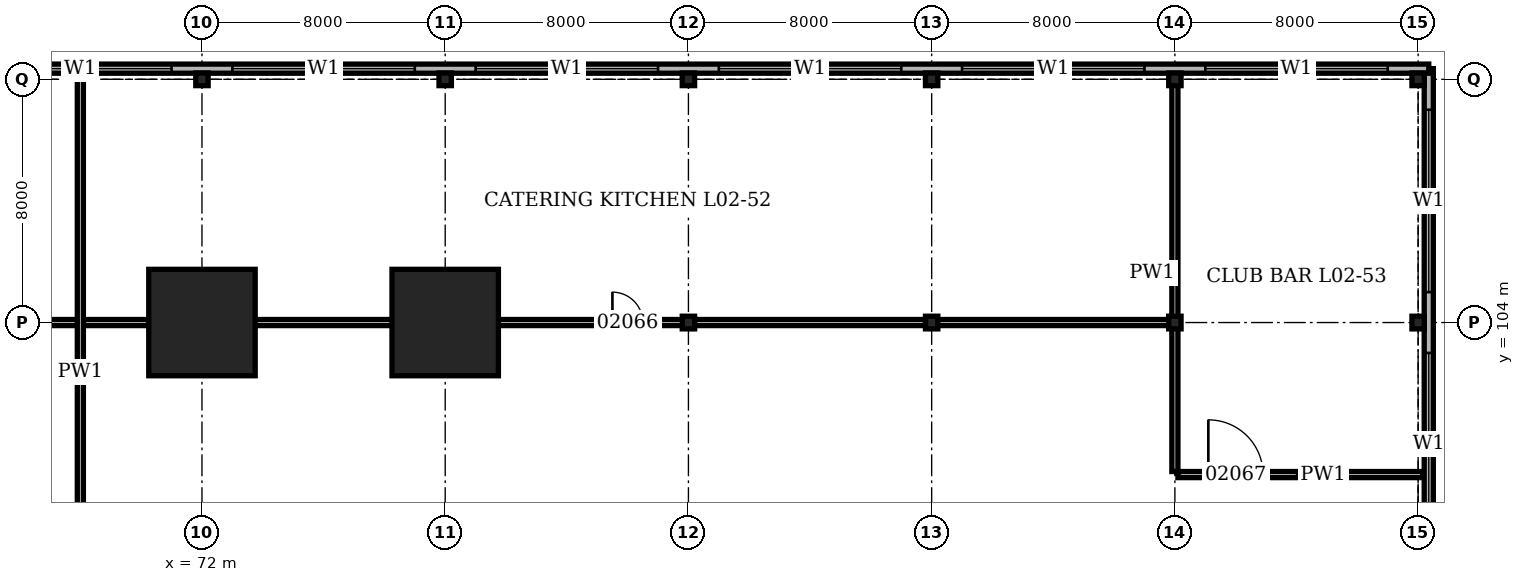
"""IFC4 building model, lengths in metres.
Left out: names, types, materials, properties, quantities, classifications, styles, units other than length and angle.
Written with IfcOpenShell. Run it as: python <this file> out.ifc"""

import sys

from ifc_helpers import new_model, si_unit, direction, frame, frame_2d, origin, origin_2d, place, context, subcontext, project, spatial, rectangle, hollow_rectangle, i_section, extrude, element, fill, save


model = new_model("IFC4")
c1 = context("Model", 3, precision=1e-05, world=origin(), true_north=direction((0.0, 1.0)))
c2 = subcontext(c1, "Body", "Model", "MODEL_VIEW")
j1 = project(units=[si_unit("LENGTHUNIT", "METRE"), si_unit("PLANEANGLEUNIT", "RADIAN")], contexts=[c1])
p1 = place(None, origin())
s1 = spatial("IfcSite", under=j1, at=p1, CompositionType="ELEMENT")
p2 = place(p1, origin())
s2 = spatial("IfcBuilding", under=s1, at=p2, CompositionType="ELEMENT")
p3 = place(p2, frame((0.0, 0.0, 9.9)))
s3 = spatial("IfcBuildingStorey", under=s2, at=p3, CompositionType="ELEMENT", Elevation=9.9)
p4 = place(p3, frame((72.0, 104.0, 0.0), z_axis=(0.0, 0.0, 1.0), x_axis=(1.0, 0.0, 0.0)))
e1 = element("IfcColumn", 1, at=p4, inside=s3, PredefinedType="COLUMN", context=c2, shape_type="SweptSolid", body=[
    extrude(hollow_rectangle(XDim=3.5, YDim=3.5, WallThickness=0.5, at=origin_2d()), origin(), (0.0, 0.0, 1.0), 5.0),
])
p5 = place(p3, frame((72.0, 112.0, 0.0), z_axis=(0.0, 0.0, 1.0), x_axis=(1.0, 0.0, 0.0)))
e2 = element("IfcColumn", 2, at=p5, inside=s3, PredefinedType="COLUMN", context=c2, shape_type="SweptSolid", body=[
    extrude(i_section(OverallWidth=0.406, OverallDepth=0.417, WebThickness=0.03, FlangeThickness=0.048, at=origin_2d()), origin(), (0.0, 0.0, 1.0), 5.0),
])
p6 = place(p3, frame((80.0, 104.0, 0.0), z_axis=(0.0, 0.0, 1.0), x_axis=(1.0, 0.0, 0.0)))
e3 = element("IfcColumn", 3, at=p6, inside=s3, PredefinedType="COLUMN", context=c2, shape_type="SweptSolid", body=[
    extrude(hollow_rectangle(XDim=3.5, YDim=3.5, WallThickness=0.5, at=origin_2d()), origin(), (0.0, 0.0, 1.0), 5.0),
])
for number, where, z_axis, x_axis in (
    (4, (80.0, 112.0, 0.0), (0.0, 0.0, 1.0), (1.0, 0.0, 0.0)),
    (5, (88.0, 104.0, 0.0), (0.0, 0.0, 1.0), (1.0, 0.0, 0.0)),
    (6, (88.0, 112.0, 0.0), (0.0, 0.0, 1.0), (1.0, 0.0, 0.0)),
    (7, (96.0, 104.0, 0.0), (0.0, 0.0, 1.0), (1.0, 0.0, 0.0)),
    (8, (96.0, 112.0, 0.0), (0.0, 0.0, 1.0), (1.0, 0.0, 0.0)),
    (9, (104.0, 104.0, 0.0), (0.0, 0.0, 1.0), (1.0, 0.0, 0.0)),
    (10, (104.0, 112.0, 0.0), (0.0, 0.0, 1.0), (1.0, 0.0, 0.0)),
    (11, (112.0, 104.0, 0.0), (0.0, 0.0, 1.0), (1.0, 0.0, 0.0)),
    (12, (112.0, 112.0, 0.0), (0.0, 0.0, 1.0), (1.0, 0.0, 0.0)),
):
    element("IfcColumn", number, at=place(p3, frame(where, z_axis=z_axis, x_axis=x_axis)), inside=s3, PredefinedType="COLUMN", context=c2, shape_type="SweptSolid", body=[
        extrude(i_section(OverallWidth=0.406, OverallDepth=0.417, WebThickness=0.03, FlangeThickness=0.048, at=origin_2d()), origin(), (0.0, 0.0, 1.0), 5.0),
    ])
p7 = place(p3, frame((112.35, -0.35, 0.0), z_axis=(0.0, 0.0, 1.0), x_axis=(0.0, 1.0, 0.0)))
e13 = element("IfcWall", 13, at=p7, inside=s3, PredefinedType="SOLIDWALL", context=c2, shape_type="SweptSolid", body=[
    extrude(rectangle(XDim=112.7, YDim=0.3, at=frame_2d((56.35, 0.0))), origin(), (0.0, 0.0, 1.0), 5.0),
])
p8 = place(p7, frame((1.35, 0.0, 1.0)))
e14 = element("IfcOpeningElement", 14, at=p8, cuts=e13, PredefinedType="OPENING", context=c2, shape_type="SweptSolid", body=[
    extrude(rectangle(XDim=6.0, YDim=1.5, at=frame_2d((3.0, 0.75))), frame((0.0, 0.16, 0.0), z_axis=(0.0, -1.0, 0.0), x_axis=(1.0, 0.0, 0.0)), (0.0, 0.0, 1.0), 0.32),
])
p9 = place(p7, frame((9.35, 0.0, 1.0)))
e15 = element("IfcOpeningElement", 15, at=p9, cuts=e13, PredefinedType="OPENING", context=c2, shape_type="SweptSolid", body=[
    extrude(rectangle(XDim=6.0, YDim=1.5, at=frame_2d((3.0, 0.75))), frame((0.0, 0.16, 0.0), z_axis=(0.0, -1.0, 0.0), x_axis=(1.0, 0.0, 0.0)), (0.0, 0.0, 1.0), 0.32),
])
p10 = place(p7, frame((17.35, 0.0, 1.0)))
e16 = element("IfcOpeningElement", 16, at=p10, cuts=e13, PredefinedType="OPENING", context=c2, shape_type="SweptSolid", body=[
    extrude(rectangle(XDim=6.0, YDim=1.5, at=frame_2d((3.0, 0.75))), frame((0.0, 0.16, 0.0), z_axis=(0.0, -1.0, 0.0), x_axis=(1.0, 0.0, 0.0)), (0.0, 0.0, 1.0), 0.32),
])
p11 = place(p7, frame((25.35, 0.0, 1.0)))
e17 = element("IfcOpeningElement", 17, at=p11, cuts=e13, PredefinedType="OPENING", context=c2, shape_type="SweptSolid", body=[
    extrude(rectangle(XDim=6.0, YDim=1.5, at=frame_2d((3.0, 0.75))), frame((0.0, 0.16, 0.0), z_axis=(0.0, -1.0, 0.0), x_axis=(1.0, 0.0, 0.0)), (0.0, 0.0, 1.0), 0.32),
])
p12 = place(p7, frame((33.35, 0.0, 1.0)))
e18 = element("IfcOpeningElement", 18, at=p12, cuts=e13, PredefinedType="OPENING", context=c2, shape_type="SweptSolid", body=[
    extrude(rectangle(XDim=6.0, YDim=1.5, at=frame_2d((3.0, 0.75))), frame((0.0, 0.16, 0.0), z_axis=(0.0, -1.0, 0.0), x_axis=(1.0, 0.0, 0.0)), (0.0, 0.0, 1.0), 0.32),
])
p13 = place(p7, frame((41.35, 0.0, 1.0)))
e19 = element("IfcOpeningElement", 19, at=p13, cuts=e13, PredefinedType="OPENING", context=c2, shape_type="SweptSolid", body=[
    extrude(rectangle(XDim=6.0, YDim=1.5, at=frame_2d((3.0, 0.75))), frame((0.0, 0.16, 0.0), z_axis=(0.0, -1.0, 0.0), x_axis=(1.0, 0.0, 0.0)), (0.0, 0.0, 1.0), 0.32),
])
p14 = place(p7, frame((49.35, 0.0, 1.0)))
e20 = element("IfcOpeningElement", 20, at=p14, cuts=e13, PredefinedType="OPENING", context=c2, shape_type="SweptSolid", body=[
    extrude(rectangle(XDim=6.0, YDim=1.5, at=frame_2d((3.0, 0.75))), frame((0.0, 0.16, 0.0), z_axis=(0.0, -1.0, 0.0), x_axis=(1.0, 0.0, 0.0)), (0.0, 0.0, 1.0), 0.32),
])
p15 = place(p7, frame((57.35, 0.0, 1.0)))
e21 = element("IfcOpeningElement", 21, at=p15, cuts=e13, PredefinedType="OPENING", context=c2, shape_type="SweptSolid", body=[
    extrude(rectangle(XDim=6.0, YDim=1.5, at=frame_2d((3.0, 0.75))), frame((0.0, 0.16, 0.0), z_axis=(0.0, -1.0, 0.0), x_axis=(1.0, 0.0, 0.0)), (0.0, 0.0, 1.0), 0.32),
])
p16 = place(p7, frame((65.35, 0.0, 1.0)))
e22 = element("IfcOpeningElement", 22, at=p16, cuts=e13, PredefinedType="OPENING", context=c2, shape_type="SweptSolid", body=[
    extrude(rectangle(XDim=6.0, YDim=1.5, at=frame_2d((3.0, 0.75))), frame((0.0, 0.16, 0.0), z_axis=(0.0, -1.0, 0.0), x_axis=(1.0, 0.0, 0.0)), (0.0, 0.0, 1.0), 0.32),
])
p17 = place(p7, frame((73.35, 0.0, 1.0)))
e23 = element("IfcOpeningElement", 23, at=p17, cuts=e13, PredefinedType="OPENING", context=c2, shape_type="SweptSolid", body=[
    extrude(rectangle(XDim=6.0, YDim=1.5, at=frame_2d((3.0, 0.75))), frame((0.0, 0.16, 0.0), z_axis=(0.0, -1.0, 0.0), x_axis=(1.0, 0.0, 0.0)), (0.0, 0.0, 1.0), 0.32),
])
p18 = place(p7, frame((81.35, 0.0, 1.0)))
e24 = element("IfcOpeningElement", 24, at=p18, cuts=e13, PredefinedType="OPENING", context=c2, shape_type="SweptSolid", body=[
    extrude(rectangle(XDim=6.0, YDim=1.5, at=frame_2d((3.0, 0.75))), frame((0.0, 0.16, 0.0), z_axis=(0.0, -1.0, 0.0), x_axis=(1.0, 0.0, 0.0)), (0.0, 0.0, 1.0), 0.32),
])
p19 = place(p7, frame((89.35, 0.0, 1.0)))
e25 = element("IfcOpeningElement", 25, at=p19, cuts=e13, PredefinedType="OPENING", context=c2, shape_type="SweptSolid", body=[
    extrude(rectangle(XDim=6.0, YDim=1.5, at=frame_2d((3.0, 0.75))), frame((0.0, 0.16, 0.0), z_axis=(0.0, -1.0, 0.0), x_axis=(1.0, 0.0, 0.0)), (0.0, 0.0, 1.0), 0.32),
])
p20 = place(p7, frame((97.35, 0.0, 1.0)))
e26 = element("IfcOpeningElement", 26, at=p20, cuts=e13, PredefinedType="OPENING", context=c2, shape_type="SweptSolid", body=[
    extrude(rectangle(XDim=6.0, YDim=1.5, at=frame_2d((3.0, 0.75))), frame((0.0, 0.16, 0.0), z_axis=(0.0, -1.0, 0.0), x_axis=(1.0, 0.0, 0.0)), (0.0, 0.0, 1.0), 0.32),
])
p21 = place(p7, frame((105.35, 0.0, 1.0)))
e27 = element("IfcOpeningElement", 27, at=p21, cuts=e13, PredefinedType="OPENING", context=c2, shape_type="SweptSolid", body=[
    extrude(rectangle(XDim=6.0, YDim=1.5, at=frame_2d((3.0, 0.75))), frame((0.0, 0.16, 0.0), z_axis=(0.0, -1.0, 0.0), x_axis=(1.0, 0.0, 0.0)), (0.0, 0.0, 1.0), 0.32),
])
p22 = place(p3, frame((112.35, 112.35, 0.0), z_axis=(0.0, 0.0, 1.0), x_axis=(-1.0, 0.0, 0.0)))
e28 = element("IfcWall", 28, at=p22, inside=s3, PredefinedType="SOLIDWALL", context=c2, shape_type="SweptSolid", body=[
    extrude(rectangle(XDim=112.7, YDim=0.3, at=frame_2d((56.35, 0.0))), origin(), (0.0, 0.0, 1.0), 5.0),
])
p23 = place(p22, frame((1.35, 0.0, 1.0)))
e29 = element("IfcOpeningElement", 29, at=p23, cuts=e28, PredefinedType="OPENING", context=c2, shape_type="SweptSolid", body=[
    extrude(rectangle(XDim=6.0, YDim=1.5, at=frame_2d((3.0, 0.75))), frame((0.0, 0.16, 0.0), z_axis=(0.0, -1.0, 0.0), x_axis=(1.0, 0.0, 0.0)), (0.0, 0.0, 1.0), 0.32),
])
p24 = place(p22, frame((9.35, 0.0, 1.0)))
e30 = element("IfcOpeningElement", 30, at=p24, cuts=e28, PredefinedType="OPENING", context=c2, shape_type="SweptSolid", body=[
    extrude(rectangle(XDim=6.0, YDim=1.5, at=frame_2d((3.0, 0.75))), frame((0.0, 0.16, 0.0), z_axis=(0.0, -1.0, 0.0), x_axis=(1.0, 0.0, 0.0)), (0.0, 0.0, 1.0), 0.32),
])
p25 = place(p22, frame((17.35, 0.0, 1.0)))
e31 = element("IfcOpeningElement", 31, at=p25, cuts=e28, PredefinedType="OPENING", context=c2, shape_type="SweptSolid", body=[
    extrude(rectangle(XDim=6.0, YDim=1.5, at=frame_2d((3.0, 0.75))), frame((0.0, 0.16, 0.0), z_axis=(0.0, -1.0, 0.0), x_axis=(1.0, 0.0, 0.0)), (0.0, 0.0, 1.0), 0.32),
])
p26 = place(p22, frame((25.35, 0.0, 1.0)))
e32 = element("IfcOpeningElement", 32, at=p26, cuts=e28, PredefinedType="OPENING", context=c2, shape_type="SweptSolid", body=[
    extrude(rectangle(XDim=6.0, YDim=1.5, at=frame_2d((3.0, 0.75))), frame((0.0, 0.16, 0.0), z_axis=(0.0, -1.0, 0.0), x_axis=(1.0, 0.0, 0.0)), (0.0, 0.0, 1.0), 0.32),
])
p27 = place(p22, frame((33.35, 0.0, 1.0)))
e33 = element("IfcOpeningElement", 33, at=p27, cuts=e28, PredefinedType="OPENING", context=c2, shape_type="SweptSolid", body=[
    extrude(rectangle(XDim=6.0, YDim=1.5, at=frame_2d((3.0, 0.75))), frame((0.0, 0.16, 0.0), z_axis=(0.0, -1.0, 0.0), x_axis=(1.0, 0.0, 0.0)), (0.0, 0.0, 1.0), 0.32),
])
p28 = place(p22, frame((41.35, 0.0, 1.0)))
e34 = element("IfcOpeningElement", 34, at=p28, cuts=e28, PredefinedType="OPENING", context=c2, shape_type="SweptSolid", body=[
    extrude(rectangle(XDim=6.0, YDim=1.5, at=frame_2d((3.0, 0.75))), frame((0.0, 0.16, 0.0), z_axis=(0.0, -1.0, 0.0), x_axis=(1.0, 0.0, 0.0)), (0.0, 0.0, 1.0), 0.32),
])
p29 = place(p22, frame((49.35, 0.0, 1.0)))
e35 = element("IfcOpeningElement", 35, at=p29, cuts=e28, PredefinedType="OPENING", context=c2, shape_type="SweptSolid", body=[
    extrude(rectangle(XDim=6.0, YDim=1.5, at=frame_2d((3.0, 0.75))), frame((0.0, 0.16, 0.0), z_axis=(0.0, -1.0, 0.0), x_axis=(1.0, 0.0, 0.0)), (0.0, 0.0, 1.0), 0.32),
])
p30 = place(p22, frame((57.35, 0.0, 1.0)))
e36 = element("IfcOpeningElement", 36, at=p30, cuts=e28, PredefinedType="OPENING", context=c2, shape_type="SweptSolid", body=[
    extrude(rectangle(XDim=6.0, YDim=1.5, at=frame_2d((3.0, 0.75))), frame((0.0, 0.16, 0.0), z_axis=(0.0, -1.0, 0.0), x_axis=(1.0, 0.0, 0.0)), (0.0, 0.0, 1.0), 0.32),
])
p31 = place(p22, frame((65.35, 0.0, 1.0)))
e37 = element("IfcOpeningElement", 37, at=p31, cuts=e28, PredefinedType="OPENING", context=c2, shape_type="SweptSolid", body=[
    extrude(rectangle(XDim=6.0, YDim=1.5, at=frame_2d((3.0, 0.75))), frame((0.0, 0.16, 0.0), z_axis=(0.0, -1.0, 0.0), x_axis=(1.0, 0.0, 0.0)), (0.0, 0.0, 1.0), 0.32),
])
p32 = place(p22, frame((73.35, 0.0, 1.0)))
e38 = element("IfcOpeningElement", 38, at=p32, cuts=e28, PredefinedType="OPENING", context=c2, shape_type="SweptSolid", body=[
    extrude(rectangle(XDim=6.0, YDim=1.5, at=frame_2d((3.0, 0.75))), frame((0.0, 0.16, 0.0), z_axis=(0.0, -1.0, 0.0), x_axis=(1.0, 0.0, 0.0)), (0.0, 0.0, 1.0), 0.32),
])
p33 = place(p22, frame((81.35, 0.0, 1.0)))
e39 = element("IfcOpeningElement", 39, at=p33, cuts=e28, PredefinedType="OPENING", context=c2, shape_type="SweptSolid", body=[
    extrude(rectangle(XDim=6.0, YDim=1.5, at=frame_2d((3.0, 0.75))), frame((0.0, 0.16, 0.0), z_axis=(0.0, -1.0, 0.0), x_axis=(1.0, 0.0, 0.0)), (0.0, 0.0, 1.0), 0.32),
])
p34 = place(p22, frame((89.35, 0.0, 1.0)))
e40 = element("IfcOpeningElement", 40, at=p34, cuts=e28, PredefinedType="OPENING", context=c2, shape_type="SweptSolid", body=[
    extrude(rectangle(XDim=6.0, YDim=1.5, at=frame_2d((3.0, 0.75))), frame((0.0, 0.16, 0.0), z_axis=(0.0, -1.0, 0.0), x_axis=(1.0, 0.0, 0.0)), (0.0, 0.0, 1.0), 0.32),
])
p35 = place(p22, frame((97.35, 0.0, 1.0)))
e41 = element("IfcOpeningElement", 41, at=p35, cuts=e28, PredefinedType="OPENING", context=c2, shape_type="SweptSolid", body=[
    extrude(rectangle(XDim=6.0, YDim=1.5, at=frame_2d((3.0, 0.75))), frame((0.0, 0.16, 0.0), z_axis=(0.0, -1.0, 0.0), x_axis=(1.0, 0.0, 0.0)), (0.0, 0.0, 1.0), 0.32),
])
p36 = place(p22, frame((105.35, 0.0, 1.0)))
e42 = element("IfcOpeningElement", 42, at=p36, cuts=e28, PredefinedType="OPENING", context=c2, shape_type="SweptSolid", body=[
    extrude(rectangle(XDim=6.0, YDim=1.5, at=frame_2d((3.0, 0.75))), frame((0.0, 0.16, 0.0), z_axis=(0.0, -1.0, 0.0), x_axis=(1.0, 0.0, 0.0)), (0.0, 0.0, 1.0), 0.32),
])
p37 = place(p3, frame((104.1, 99.0, 0.0), z_axis=(0.0, 0.0, 1.0), x_axis=(1.0, 0.0, 0.0)))
e43 = element("IfcWall", 43, at=p37, inside=s3, PredefinedType="PARTITIONING", context=c2, shape_type="SweptSolid", body=[
    extrude(rectangle(XDim=8.05, YDim=0.2, at=frame_2d((4.025, 0.0))), origin(), (0.0, 0.0, 1.0), 4.8),
])
p38 = place(p37, frame((1.0, 0.0, 0.0)))
e44 = element("IfcOpeningElement", 44, at=p38, cuts=e43, PredefinedType="OPENING", context=c2, shape_type="SweptSolid", body=[
    extrude(rectangle(XDim=1.8, YDim=2.4, at=frame_2d((0.9, 1.2))), frame((0.0, 0.11, 0.0), z_axis=(0.0, -1.0, 0.0), x_axis=(1.0, 0.0, 0.0)), (0.0, 0.0, 1.0), 0.22),
])
p39 = place(p3, frame((12.95, 104.0, 0.0), z_axis=(0.0, 0.0, 1.0), x_axis=(1.0, 0.0, 0.0)))
e45 = element("IfcWall", 45, at=p39, inside=s3, PredefinedType="PARTITIONING", context=c2, shape_type="SweptSolid", body=[
    extrude(rectangle(XDim=90.95, YDim=0.2, at=frame_2d((45.475, 0.0))), origin(), (0.0, 0.0, 1.0), 4.028),
])
p40 = place(p39, frame((14.575, 0.0, 0.0)))
e46 = element("IfcOpeningElement", 46, at=p40, cuts=e45, PredefinedType="OPENING", context=c2, shape_type="SweptSolid", body=[
    extrude(rectangle(XDim=1.8, YDim=2.4, at=frame_2d((0.9, 1.2))), frame((0.0, 0.11, 0.0), z_axis=(0.0, -1.0, 0.0), x_axis=(1.0, 0.0, 0.0)), (0.0, 0.0, 1.0), 0.22),
])
p41 = place(p39, frame((37.15, 0.0, 0.0)))
e47 = element("IfcOpeningElement", 47, at=p41, cuts=e45, PredefinedType="OPENING", context=c2, shape_type="SweptSolid", body=[
    extrude(rectangle(XDim=1.8, YDim=2.4, at=frame_2d((0.9, 1.2))), frame((0.0, 0.11, 0.0), z_axis=(0.0, -1.0, 0.0), x_axis=(1.0, 0.0, 0.0)), (0.0, 0.0, 1.0), 0.22),
])
p42 = place(p39, frame((72.55, 0.0, 0.0)))
e48 = element("IfcOpeningElement", 48, at=p42, cuts=e45, PredefinedType="OPENING", context=c2, shape_type="SweptSolid", body=[
    extrude(rectangle(XDim=1.0, YDim=2.1, at=frame_2d((0.5, 1.05))), frame((0.0, 0.11, 0.0), z_axis=(0.0, -1.0, 0.0), x_axis=(1.0, 0.0, 0.0)), (0.0, 0.0, 1.0), 0.22),
])
p43 = place(p3, frame((68.0, 92.6, 0.0), z_axis=(0.0, 0.0, 1.0), x_axis=(0.0, 1.0, 0.0)))
e49 = element("IfcWall", 49, at=p43, inside=s3, PredefinedType="PARTITIONING", context=c2, shape_type="SweptSolid", body=[
    extrude(rectangle(XDim=19.55, YDim=0.2, at=frame_2d((9.775, 0.0))), origin(), (0.0, 0.0, 1.0), 4.8),
])
p44 = place(p3, frame((104.0, 99.1, 0.0), z_axis=(0.0, 0.0, 1.0), x_axis=(0.0, 1.0, 0.0)))
e50 = element("IfcWall", 50, at=p44, inside=s3, PredefinedType="PARTITIONING", context=c2, shape_type="SweptSolid", body=[
    extrude(rectangle(XDim=13.05, YDim=0.2, at=frame_2d((6.525, 0.0))), origin(), (0.0, 0.0, 1.0), 4.028),
])
p45 = place(p20, origin())
e51 = element("IfcWindow", 51, at=p45, inside=s3, PartitioningType="SINGLE_PANEL", PredefinedType="WINDOW", context=c2, shape_type="SweptSolid", body=[
    extrude(rectangle(XDim=6.0, YDim=1.5, at=frame_2d((3.0, 0.75))), frame((0.0, 0.03, 0.0), z_axis=(0.0, -1.0, 0.0), x_axis=(1.0, 0.0, 0.0)), (0.0, 0.0, 1.0), 0.06),
])
fill(e26, e51)
p46 = place(p21, origin())
e52 = element("IfcWindow", 52, at=p46, inside=s3, PartitioningType="SINGLE_PANEL", PredefinedType="WINDOW", context=c2, shape_type="SweptSolid", body=[
    extrude(rectangle(XDim=6.0, YDim=1.5, at=frame_2d((3.0, 0.75))), frame((0.0, 0.03, 0.0), z_axis=(0.0, -1.0, 0.0), x_axis=(1.0, 0.0, 0.0)), (0.0, 0.0, 1.0), 0.06),
])
fill(e27, e52)
p47 = place(p23, origin())
e53 = element("IfcWindow", 53, at=p47, inside=s3, PartitioningType="SINGLE_PANEL", PredefinedType="WINDOW", context=c2, shape_type="SweptSolid", body=[
    extrude(rectangle(XDim=6.0, YDim=1.5, at=frame_2d((3.0, 0.75))), frame((0.0, 0.03, 0.0), z_axis=(0.0, -1.0, 0.0), x_axis=(1.0, 0.0, 0.0)), (0.0, 0.0, 1.0), 0.06),
])
fill(e29, e53)
p48 = place(p24, origin())
e54 = element("IfcWindow", 54, at=p48, inside=s3, PartitioningType="SINGLE_PANEL", PredefinedType="WINDOW", context=c2, shape_type="SweptSolid", body=[
    extrude(rectangle(XDim=6.0, YDim=1.5, at=frame_2d((3.0, 0.75))), frame((0.0, 0.03, 0.0), z_axis=(0.0, -1.0, 0.0), x_axis=(1.0, 0.0, 0.0)), (0.0, 0.0, 1.0), 0.06),
])
fill(e30, e54)
p49 = place(p25, origin())
e55 = element("IfcWindow", 55, at=p49, inside=s3, PartitioningType="SINGLE_PANEL", PredefinedType="WINDOW", context=c2, shape_type="SweptSolid", body=[
    extrude(rectangle(XDim=6.0, YDim=1.5, at=frame_2d((3.0, 0.75))), frame((0.0, 0.03, 0.0), z_axis=(0.0, -1.0, 0.0), x_axis=(1.0, 0.0, 0.0)), (0.0, 0.0, 1.0), 0.06),
])
fill(e31, e55)
p50 = place(p26, origin())
e56 = element("IfcWindow", 56, at=p50, inside=s3, PartitioningType="SINGLE_PANEL", PredefinedType="WINDOW", context=c2, shape_type="SweptSolid", body=[
    extrude(rectangle(XDim=6.0, YDim=1.5, at=frame_2d((3.0, 0.75))), frame((0.0, 0.03, 0.0), z_axis=(0.0, -1.0, 0.0), x_axis=(1.0, 0.0, 0.0)), (0.0, 0.0, 1.0), 0.06),
])
fill(e32, e56)
p51 = place(p27, origin())
e57 = element("IfcWindow", 57, at=p51, inside=s3, PartitioningType="SINGLE_PANEL", PredefinedType="WINDOW", context=c2, shape_type="SweptSolid", body=[
    extrude(rectangle(XDim=6.0, YDim=1.5, at=frame_2d((3.0, 0.75))), frame((0.0, 0.03, 0.0), z_axis=(0.0, -1.0, 0.0), x_axis=(1.0, 0.0, 0.0)), (0.0, 0.0, 1.0), 0.06),
])
fill(e33, e57)
p52 = place(p28, origin())
e58 = element("IfcWindow", 58, at=p52, inside=s3, PartitioningType="SINGLE_PANEL", PredefinedType="WINDOW", context=c2, shape_type="SweptSolid", body=[
    extrude(rectangle(XDim=6.0, YDim=1.5, at=frame_2d((3.0, 0.75))), frame((0.0, 0.03, 0.0), z_axis=(0.0, -1.0, 0.0), x_axis=(1.0, 0.0, 0.0)), (0.0, 0.0, 1.0), 0.06),
])
fill(e34, e58)
p53 = place(p42, origin())
e59 = element("IfcDoor", 59, at=p53, inside=s3, OperationType="SINGLE_SWING_LEFT", PredefinedType="DOOR", context=c2, shape_type="SweptSolid", body=[
    extrude(rectangle(XDim=1.0, YDim=2.1, at=frame_2d((0.5, 1.05))), frame((0.0, 0.1, 0.0), z_axis=(0.0, -1.0, 0.0), x_axis=(1.0, 0.0, 0.0)), (0.0, 0.0, 1.0), 0.199),
])
fill(e48, e59)
p54 = place(p38, origin())
e60 = element("IfcDoor", 60, at=p54, inside=s3, OperationType="DOUBLE_DOOR_DOUBLE_SWING", PredefinedType="DOOR", context=c2, shape_type="SweptSolid", body=[
    extrude(rectangle(XDim=1.8, YDim=2.4, at=frame_2d((0.9, 1.2))), frame((0.0, 0.1, 0.0), z_axis=(0.0, -1.0, 0.0), x_axis=(1.0, 0.0, 0.0)), (0.0, 0.0, 1.0), 0.199),
])
fill(e44, e60)
save(model, sys.argv[1])
